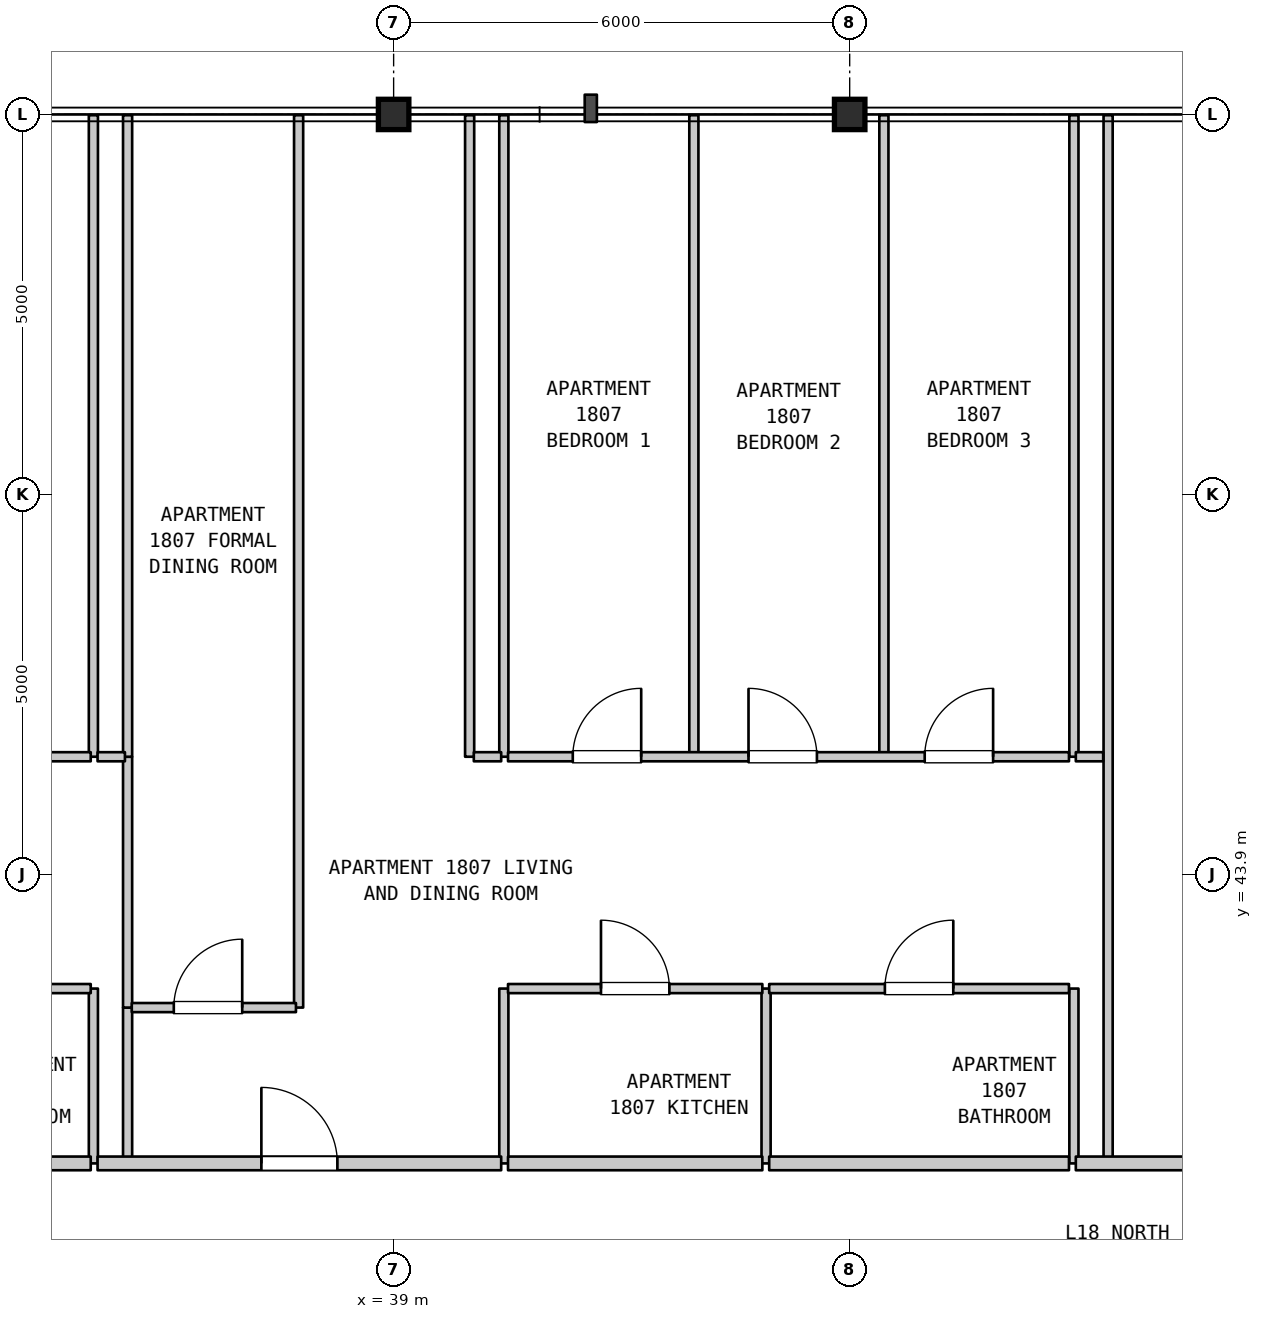
"""IFC4 building model, lengths in metres.
Left out: names, types, materials, properties, quantities, classifications, styles, units other than length and angle.
Written with IfcOpenShell. Run it as: python <this file> out.ifc"""

import sys

from ifc_helpers import new_model, si_unit, direction, frame, frame_2d, origin, origin_2d, place, context, subcontext, project, spatial, rectangle, i_section, extrude, element, fill, save


model = new_model("IFC4")
c1 = context("Model", 3, precision=1e-05, world=origin(), true_north=direction((0.0, 1.0)))
c2 = subcontext(c1, "Body", "Model", "MODEL_VIEW")
j1 = project(units=[si_unit("LENGTHUNIT", "METRE"), si_unit("PLANEANGLEUNIT", "RADIAN")], contexts=[c1])
p1 = place(None, origin())
s1 = spatial("IfcSite", under=j1, at=p1, CompositionType="ELEMENT")
p2 = place(p1, origin())
s2 = spatial("IfcBuilding", under=s1, at=p2, CompositionType="ELEMENT")
p3 = place(p2, frame((0.0, 0.0, 77.5)))
s3 = spatial("IfcBuildingStorey", under=s2, at=p3, CompositionType="ELEMENT", Elevation=77.5)
for number, where, z_axis, x_axis in (
    (1, (39.0, 53.9, 0.0), (0.0, 0.0, 1.0), (1.0, 0.0, 0.0)),
    (2, (45.0, 53.9, 0.0), (0.0, 0.0, 1.0), (1.0, 0.0, 0.0)),
):
    element("IfcColumn", number, at=place(p3, frame(where, z_axis=z_axis, x_axis=x_axis)), inside=s3, PredefinedType="COLUMN", context=c2, shape_type="SweptSolid", body=[
        extrude(i_section(OverallWidth=0.401, OverallDepth=0.399, WebThickness=0.025, FlangeThickness=0.04, FilletRadius=0.015, at=origin_2d()), origin(), (0.0, 0.0, 1.0), 3.7),
    ])
p4 = place(p3, frame((35.05, 40.1, 0.0), z_axis=(0.0, 0.0, 1.0), x_axis=(0.0, 1.0, 0.0)))
e3 = element("IfcWall", 3, at=p4, inside=s3, PredefinedType="PARTITIONING", context=c2, shape_type="SweptSolid", body=[
    extrude(rectangle(XDim=2.3, YDim=0.12, at=frame_2d((1.15, 0.0))), origin(), (0.0, 0.0, 1.0), 3.28),
])
p5 = place(p3, frame((35.05, 45.45, 0.0), z_axis=(0.0, 0.0, 1.0), x_axis=(0.0, 1.0, 0.0)))
e4 = element("IfcWall", 4, at=p5, inside=s3, PredefinedType="PARTITIONING", context=c2, shape_type="SweptSolid", body=[
    extrude(rectangle(XDim=8.44, YDim=0.12, at=frame_2d((4.22, 0.0))), origin(), (0.0, 0.0, 1.0), 3.28),
])
p6 = place(p3, frame((35.5, 40.1, 0.0), z_axis=(0.0, 0.0, 1.0), x_axis=(0.0, 1.0, 0.0)))
e5 = element("IfcWall", 5, at=p6, inside=s3, PredefinedType="PARTITIONING", context=c2, shape_type="SweptSolid", body=[
    extrude(rectangle(XDim=2.05, YDim=0.12, at=frame_2d((1.025, 0.0))), origin(), (0.0, 0.0, 1.0), 3.28),
])
p7 = place(p3, frame((35.5, 42.15, 0.0), z_axis=(0.0, 0.0, 1.0), x_axis=(0.0, 1.0, 0.0)))
e6 = element("IfcWall", 6, at=p7, inside=s3, PredefinedType="PARTITIONING", context=c2, shape_type="SweptSolid", body=[
    extrude(rectangle(XDim=3.3, YDim=0.12, at=frame_2d((1.65, 0.0))), origin(), (0.0, 0.0, 1.0), 3.28),
])
p8 = place(p3, frame((35.5, 45.45, 0.0), z_axis=(0.0, 0.0, 1.0), x_axis=(0.0, 1.0, 0.0)))
e7 = element("IfcWall", 7, at=p8, inside=s3, PredefinedType="PARTITIONING", context=c2, shape_type="SweptSolid", body=[
    extrude(rectangle(XDim=8.44, YDim=0.12, at=frame_2d((4.22, 0.0))), origin(), (0.0, 0.0, 1.0), 3.28),
])
p9 = place(p3, frame((37.75, 42.15, 0.0), z_axis=(0.0, 0.0, 1.0), x_axis=(0.0, 1.0, 0.0)))
e8 = element("IfcWall", 8, at=p9, inside=s3, PredefinedType="PARTITIONING", context=c2, shape_type="SweptSolid", body=[
    extrude(rectangle(XDim=11.74, YDim=0.12, at=frame_2d((5.87, 0.0))), origin(), (0.0, 0.0, 1.0), 3.28),
])
p10 = place(p3, frame((40.0, 45.45, 0.0), z_axis=(0.0, 0.0, 1.0), x_axis=(0.0, 1.0, 0.0)))
e9 = element("IfcWall", 9, at=p10, inside=s3, PredefinedType="PARTITIONING", context=c2, shape_type="SweptSolid", body=[
    extrude(rectangle(XDim=8.44, YDim=0.12, at=frame_2d((4.22, 0.0))), origin(), (0.0, 0.0, 1.0), 3.28),
])
p11 = place(p3, frame((40.45, 40.1, 0.0), z_axis=(0.0, 0.0, 1.0), x_axis=(0.0, 1.0, 0.0)))
e10 = element("IfcWall", 10, at=p11, inside=s3, PredefinedType="PARTITIONING", context=c2, shape_type="SweptSolid", body=[
    extrude(rectangle(XDim=2.3, YDim=0.12, at=frame_2d((1.15, 0.0))), origin(), (0.0, 0.0, 1.0), 3.28),
])
for number, where, z_axis, x_axis in (
    (11, (40.45, 45.45, 0.0), (0.0, 0.0, 1.0), (0.0, 1.0, 0.0)),
    (12, (42.95, 45.45, 0.0), (0.0, 0.0, 1.0), (0.0, 1.0, 0.0)),
):
    element("IfcWall", number, at=place(p3, frame(where, z_axis=z_axis, x_axis=x_axis)), inside=s3, PredefinedType="PARTITIONING", context=c2, shape_type="SweptSolid", body=[
        extrude(rectangle(XDim=8.44, YDim=0.12, at=frame_2d((4.22, 0.0))), origin(), (0.0, 0.0, 1.0), 3.28),
    ])
p12 = place(p3, frame((43.9, 40.1, 0.0), z_axis=(0.0, 0.0, 1.0), x_axis=(0.0, 1.0, 0.0)))
e13 = element("IfcWall", 13, at=p12, inside=s3, PredefinedType="PARTITIONING", context=c2, shape_type="SweptSolid", body=[
    extrude(rectangle(XDim=2.3, YDim=0.12, at=frame_2d((1.15, 0.0))), origin(), (0.0, 0.0, 1.0), 3.28),
])
p13 = place(p3, frame((45.45, 45.45, 0.0), z_axis=(0.0, 0.0, 1.0), x_axis=(0.0, 1.0, 0.0)))
e14 = element("IfcWall", 14, at=p13, inside=s3, PredefinedType="PARTITIONING", context=c2, shape_type="SweptSolid", body=[
    extrude(rectangle(XDim=8.44, YDim=0.12, at=frame_2d((4.22, 0.0))), origin(), (0.0, 0.0, 1.0), 3.28),
])
p14 = place(p3, frame((47.95, 40.1, 0.0), z_axis=(0.0, 0.0, 1.0), x_axis=(0.0, 1.0, 0.0)))
e15 = element("IfcWall", 15, at=p14, inside=s3, PredefinedType="PARTITIONING", context=c2, shape_type="SweptSolid", body=[
    extrude(rectangle(XDim=2.3, YDim=0.12, at=frame_2d((1.15, 0.0))), origin(), (0.0, 0.0, 1.0), 3.28),
])
p15 = place(p3, frame((47.95, 45.45, 0.0), z_axis=(0.0, 0.0, 1.0), x_axis=(0.0, 1.0, 0.0)))
e16 = element("IfcWall", 16, at=p15, inside=s3, PredefinedType="PARTITIONING", context=c2, shape_type="SweptSolid", body=[
    extrude(rectangle(XDim=8.44, YDim=0.12, at=frame_2d((4.22, 0.0))), origin(), (0.0, 0.0, 1.0), 3.28),
])
p16 = place(p3, frame((48.4, 40.1, 0.0), z_axis=(0.0, 0.0, 1.0), x_axis=(0.0, 1.0, 0.0)))
e17 = element("IfcWall", 17, at=p16, inside=s3, PredefinedType="PARTITIONING", context=c2, shape_type="SweptSolid", body=[
    extrude(rectangle(XDim=13.79, YDim=0.12, at=frame_2d((6.895, 0.0))), origin(), (0.0, 0.0, 1.0), 3.28),
])
p17 = place(p3, frame((31.071, 40.1, 0.0), z_axis=(0.0, 0.0, 1.0), x_axis=(1.0, 0.0, 0.0)))
e18 = element("IfcWall", 18, at=p17, inside=s3, PredefinedType="STANDARD", context=c2, shape_type="SweptSolid", body=[
    extrude(rectangle(XDim=3.944, YDim=0.18, at=frame_2d((1.972, 0.0))), origin(), (0.0, 0.0, 1.0), 3.28),
])
p18 = place(p3, frame((35.105, 40.1, 0.0), z_axis=(0.0, 0.0, 1.0), x_axis=(1.0, 0.0, 0.0)))
e19 = element("IfcWall", 19, at=p18, inside=s3, PredefinedType="STANDARD", context=c2, shape_type="SweptSolid", body=[
    extrude(rectangle(XDim=5.31, YDim=0.18, at=frame_2d((2.655, 0.0))), origin(), (0.0, 0.0, 1.0), 3.28),
])
p19 = place(p18, frame((2.155, 0.0, 0.0)))
e20 = element("IfcOpeningElement", 20, at=p19, cuts=e19, PredefinedType="OPENING", context=c2, shape_type="SweptSolid", body=[
    extrude(rectangle(XDim=1.0, YDim=2.15, at=frame_2d((0.5, 1.075))), frame((0.0, 0.1, 0.0), z_axis=(0.0, -1.0, 0.0), x_axis=(1.0, 0.0, 0.0)), (0.0, 0.0, 1.0), 0.2),
])
p20 = place(p3, frame((40.505, 40.1, 0.0), z_axis=(0.0, 0.0, 1.0), x_axis=(1.0, 0.0, 0.0)))
e21 = element("IfcWall", 21, at=p20, inside=s3, PredefinedType="STANDARD", context=c2, shape_type="SweptSolid", body=[
    extrude(rectangle(XDim=3.346, YDim=0.18, at=frame_2d((1.673, 0.0))), origin(), (0.0, 0.0, 1.0), 3.28),
])
p21 = place(p3, frame((43.941, 40.1, 0.0), z_axis=(0.0, 0.0, 1.0), x_axis=(1.0, 0.0, 0.0)))
e22 = element("IfcWall", 22, at=p21, inside=s3, PredefinedType="STANDARD", context=c2, shape_type="SweptSolid", body=[
    extrude(rectangle(XDim=3.944, YDim=0.18, at=frame_2d((1.972, 0.0))), origin(), (0.0, 0.0, 1.0), 3.28),
])
p22 = place(p3, frame((47.975, 40.1, 0.0), z_axis=(0.0, 0.0, 1.0), x_axis=(1.0, 0.0, 0.0)))
e23 = element("IfcWall", 23, at=p22, inside=s3, PredefinedType="STANDARD", context=c2, shape_type="SweptSolid", body=[
    extrude(rectangle(XDim=5.28, YDim=0.18, at=frame_2d((2.64, 0.0))), origin(), (0.0, 0.0, 1.0), 3.28),
])
p23 = place(p22, frame((2.34, 0.0, 0.0)))
e24 = element("IfcOpeningElement", 24, at=p23, cuts=e23, PredefinedType="OPENING", context=c2, shape_type="SweptSolid", body=[
    extrude(rectangle(XDim=1.0, YDim=2.15, at=frame_2d((0.5, 1.075))), frame((0.0, 0.1, 0.0), z_axis=(0.0, -1.0, 0.0), x_axis=(1.0, 0.0, 0.0)), (0.0, 0.0, 1.0), 0.2),
])
p24 = place(p3, frame((35.555, 42.15, 0.0), z_axis=(0.0, 0.0, 1.0), x_axis=(1.0, 0.0, 0.0)))
e25 = element("IfcWall", 25, at=p24, inside=s3, PredefinedType="PARTITIONING", context=c2, shape_type="SweptSolid", body=[
    extrude(rectangle(XDim=2.16, YDim=0.12, at=frame_2d((1.08, 0.0))), origin(), (0.0, 0.0, 1.0), 3.28),
])
p25 = place(p24, frame((0.553, 0.0, 0.0)))
e26 = element("IfcOpeningElement", 26, at=p25, cuts=e25, PredefinedType="OPENING", context=c2, shape_type="SweptSolid", body=[
    extrude(rectangle(XDim=0.9, YDim=2.15, at=frame_2d((0.45, 1.075))), frame((0.0, 0.07, 0.0), z_axis=(0.0, -1.0, 0.0), x_axis=(1.0, 0.0, 0.0)), (0.0, 0.0, 1.0), 0.14),
])
p26 = place(p3, frame((31.071, 42.4, 0.0), z_axis=(0.0, 0.0, 1.0), x_axis=(1.0, 0.0, 0.0)))
e27 = element("IfcWall", 27, at=p26, inside=s3, PredefinedType="PARTITIONING", context=c2, shape_type="SweptSolid", body=[
    extrude(rectangle(XDim=3.944, YDim=0.12, at=frame_2d((1.972, 0.0))), origin(), (0.0, 0.0, 1.0), 3.28),
])
p27 = place(p26, frame((1.522, 0.0, 0.0)))
e28 = element("IfcOpeningElement", 28, at=p27, cuts=e27, PredefinedType="OPENING", context=c2, shape_type="SweptSolid", body=[
    extrude(rectangle(XDim=0.9, YDim=2.1, at=frame_2d((0.45, 1.05))), frame((0.0, 0.07, 0.0), z_axis=(0.0, -1.0, 0.0), x_axis=(1.0, 0.0, 0.0)), (0.0, 0.0, 1.0), 0.14),
])
p28 = place(p3, frame((40.505, 42.4, 0.0), z_axis=(0.0, 0.0, 1.0), x_axis=(1.0, 0.0, 0.0)))
e29 = element("IfcWall", 29, at=p28, inside=s3, PredefinedType="PARTITIONING", context=c2, shape_type="SweptSolid", body=[
    extrude(rectangle(XDim=3.346, YDim=0.12, at=frame_2d((1.673, 0.0))), origin(), (0.0, 0.0, 1.0), 3.28),
])
p29 = place(p28, frame((1.223, 0.0, 0.0)))
e30 = element("IfcOpeningElement", 30, at=p29, cuts=e29, PredefinedType="OPENING", context=c2, shape_type="SweptSolid", body=[
    extrude(rectangle(XDim=0.9, YDim=2.15, at=frame_2d((0.45, 1.075))), frame((0.0, 0.07, 0.0), z_axis=(0.0, -1.0, 0.0), x_axis=(1.0, 0.0, 0.0)), (0.0, 0.0, 1.0), 0.14),
])
p30 = place(p3, frame((43.941, 42.4, 0.0), z_axis=(0.0, 0.0, 1.0), x_axis=(1.0, 0.0, 0.0)))
e31 = element("IfcWall", 31, at=p30, inside=s3, PredefinedType="PARTITIONING", context=c2, shape_type="SweptSolid", body=[
    extrude(rectangle(XDim=3.944, YDim=0.12, at=frame_2d((1.972, 0.0))), origin(), (0.0, 0.0, 1.0), 3.28),
])
p31 = place(p30, frame((1.522, 0.0, 0.0)))
e32 = element("IfcOpeningElement", 32, at=p31, cuts=e31, PredefinedType="OPENING", context=c2, shape_type="SweptSolid", body=[
    extrude(rectangle(XDim=0.9, YDim=2.1, at=frame_2d((0.45, 1.05))), frame((0.0, 0.07, 0.0), z_axis=(0.0, -1.0, 0.0), x_axis=(1.0, 0.0, 0.0)), (0.0, 0.0, 1.0), 0.14),
])
p32 = place(p3, frame((27.635, 45.45, 0.0), z_axis=(0.0, 0.0, 1.0), x_axis=(1.0, 0.0, 0.0)))
e33 = element("IfcWall", 33, at=p32, inside=s3, PredefinedType="PARTITIONING", context=c2, shape_type="SweptSolid", body=[
    extrude(rectangle(XDim=7.38, YDim=0.12, at=frame_2d((3.69, 0.0))), origin(), (0.0, 0.0, 1.0), 3.28),
])
p33 = place(p32, frame((0.852, 0.0, 0.0)))
e34 = element("IfcOpeningElement", 34, at=p33, cuts=e33, PredefinedType="OPENING", context=c2, shape_type="SweptSolid", body=[
    extrude(rectangle(XDim=0.9, YDim=2.15, at=frame_2d((0.45, 1.075))), frame((0.0, 0.07, 0.0), z_axis=(0.0, -1.0, 0.0), x_axis=(1.0, 0.0, 0.0)), (0.0, 0.0, 1.0), 0.14),
])
p34 = place(p32, frame((3.164, 0.0, 0.0)))
e35 = element("IfcOpeningElement", 35, at=p34, cuts=e33, PredefinedType="OPENING", context=c2, shape_type="SweptSolid", body=[
    extrude(rectangle(XDim=0.9, YDim=2.15, at=frame_2d((0.45, 1.075))), frame((0.0, 0.07, 0.0), z_axis=(0.0, -1.0, 0.0), x_axis=(1.0, 0.0, 0.0)), (0.0, 0.0, 1.0), 0.14),
])
p35 = place(p32, frame((5.482, 0.0, 0.0)))
e36 = element("IfcOpeningElement", 36, at=p35, cuts=e33, PredefinedType="OPENING", context=c2, shape_type="SweptSolid", body=[
    extrude(rectangle(XDim=0.9, YDim=2.15, at=frame_2d((0.45, 1.075))), frame((0.0, 0.07, 0.0), z_axis=(0.0, -1.0, 0.0), x_axis=(1.0, 0.0, 0.0)), (0.0, 0.0, 1.0), 0.14),
])
for number, where, z_axis, x_axis in (
    (37, (35.105, 45.45, 0.0), (0.0, 0.0, 1.0), (1.0, 0.0, 0.0)),
    (38, (40.055, 45.45, 0.0), (0.0, 0.0, 1.0), (1.0, 0.0, 0.0)),
):
    element("IfcWall", number, at=place(p3, frame(where, z_axis=z_axis, x_axis=x_axis)), inside=s3, PredefinedType="PARTITIONING", context=c2, shape_type="SweptSolid", body=[
        extrude(rectangle(XDim=0.36, YDim=0.12, at=frame_2d((0.18, 0.0))), origin(), (0.0, 0.0, 1.0), 3.28),
    ])
p36 = place(p3, frame((40.505, 45.45, 0.0), z_axis=(0.0, 0.0, 1.0), x_axis=(1.0, 0.0, 0.0)))
e39 = element("IfcWall", 39, at=p36, inside=s3, PredefinedType="PARTITIONING", context=c2, shape_type="SweptSolid", body=[
    extrude(rectangle(XDim=7.38, YDim=0.12, at=frame_2d((3.69, 0.0))), origin(), (0.0, 0.0, 1.0), 3.28),
])
p37 = place(p36, frame((0.852, 0.0, 0.0)))
e40 = element("IfcOpeningElement", 40, at=p37, cuts=e39, PredefinedType="OPENING", context=c2, shape_type="SweptSolid", body=[
    extrude(rectangle(XDim=0.9, YDim=2.15, at=frame_2d((0.45, 1.075))), frame((0.0, 0.07, 0.0), z_axis=(0.0, -1.0, 0.0), x_axis=(1.0, 0.0, 0.0)), (0.0, 0.0, 1.0), 0.14),
])
p38 = place(p36, frame((3.164, 0.0, 0.0)))
e41 = element("IfcOpeningElement", 41, at=p38, cuts=e39, PredefinedType="OPENING", context=c2, shape_type="SweptSolid", body=[
    extrude(rectangle(XDim=0.9, YDim=2.15, at=frame_2d((0.45, 1.075))), frame((0.0, 0.07, 0.0), z_axis=(0.0, -1.0, 0.0), x_axis=(1.0, 0.0, 0.0)), (0.0, 0.0, 1.0), 0.14),
])
p39 = place(p36, frame((5.482, 0.0, 0.0)))
e42 = element("IfcOpeningElement", 42, at=p39, cuts=e39, PredefinedType="OPENING", context=c2, shape_type="SweptSolid", body=[
    extrude(rectangle(XDim=0.9, YDim=2.15, at=frame_2d((0.45, 1.075))), frame((0.0, 0.07, 0.0), z_axis=(0.0, -1.0, 0.0), x_axis=(1.0, 0.0, 0.0)), (0.0, 0.0, 1.0), 0.14),
])
p40 = place(p3, frame((47.975, 45.45, 0.0), z_axis=(0.0, 0.0, 1.0), x_axis=(1.0, 0.0, 0.0)))
e43 = element("IfcWall", 43, at=p40, inside=s3, PredefinedType="PARTITIONING", context=c2, shape_type="SweptSolid", body=[
    extrude(rectangle(XDim=0.36, YDim=0.12, at=frame_2d((0.18, 0.0))), origin(), (0.0, 0.0, 1.0), 3.28),
])
p41 = place(p19, origin())
e44 = element("IfcDoor", 44, at=p41, inside=s3, OperationType="SINGLE_SWING_LEFT", PredefinedType="DOOR", context=c2, shape_type="SweptSolid", body=[
    extrude(rectangle(XDim=1.0, YDim=2.15, at=frame_2d((0.5, 1.075))), frame((0.0, 0.025, 0.0), z_axis=(0.0, -1.0, 0.0), x_axis=(1.0, 0.0, 0.0)), (0.0, 0.0, 1.0), 0.05),
])
fill(e20, e44)
p42 = place(p25, origin())
e45 = element("IfcDoor", 45, at=p42, inside=s3, OperationType="SINGLE_SWING_RIGHT", PredefinedType="DOOR", context=c2, shape_type="SweptSolid", body=[
    extrude(rectangle(XDim=0.9, YDim=2.15, at=frame_2d((0.45, 1.075))), frame((0.0, 0.025, 0.0), z_axis=(0.0, -1.0, 0.0), x_axis=(1.0, 0.0, 0.0)), (0.0, 0.0, 1.0), 0.05),
])
fill(e26, e45)
p43 = place(p29, origin())
e46 = element("IfcDoor", 46, at=p43, inside=s3, OperationType="SINGLE_SWING_LEFT", PredefinedType="DOOR", context=c2, shape_type="SweptSolid", body=[
    extrude(rectangle(XDim=0.9, YDim=2.15, at=frame_2d((0.45, 1.075))), frame((0.0, 0.025, 0.0), z_axis=(0.0, -1.0, 0.0), x_axis=(1.0, 0.0, 0.0)), (0.0, 0.0, 1.0), 0.05),
])
fill(e30, e46)
p44 = place(p31, origin())
e47 = element("IfcDoor", 47, at=p44, inside=s3, OperationType="SINGLE_SWING_RIGHT", PredefinedType="DOOR", context=c2, shape_type="SweptSolid", body=[
    extrude(rectangle(XDim=0.9, YDim=2.1, at=frame_2d((0.45, 1.05))), frame((0.0, 0.025, 0.0), z_axis=(0.0, -1.0, 0.0), x_axis=(1.0, 0.0, 0.0)), (0.0, 0.0, 1.0), 0.05),
])
fill(e32, e47)
p45 = place(p37, origin())
e48 = element("IfcDoor", 48, at=p45, inside=s3, OperationType="SINGLE_SWING_RIGHT", PredefinedType="DOOR", context=c2, shape_type="SweptSolid", body=[
    extrude(rectangle(XDim=0.9, YDim=2.15, at=frame_2d((0.45, 1.075))), frame((0.0, 0.025, 0.0), z_axis=(0.0, -1.0, 0.0), x_axis=(1.0, 0.0, 0.0)), (0.0, 0.0, 1.0), 0.05),
])
fill(e40, e48)
p46 = place(p38, origin())
e49 = element("IfcDoor", 49, at=p46, inside=s3, OperationType="SINGLE_SWING_LEFT", PredefinedType="DOOR", context=c2, shape_type="SweptSolid", body=[
    extrude(rectangle(XDim=0.9, YDim=2.15, at=frame_2d((0.45, 1.075))), frame((0.0, 0.025, 0.0), z_axis=(0.0, -1.0, 0.0), x_axis=(1.0, 0.0, 0.0)), (0.0, 0.0, 1.0), 0.05),
])
fill(e41, e49)
p47 = place(p39, origin())
e50 = element("IfcDoor", 50, at=p47, inside=s3, OperationType="SINGLE_SWING_RIGHT", PredefinedType="DOOR", context=c2, shape_type="SweptSolid", body=[
    extrude(rectangle(XDim=0.9, YDim=2.15, at=frame_2d((0.45, 1.075))), frame((0.0, 0.025, 0.0), z_axis=(0.0, -1.0, 0.0), x_axis=(1.0, 0.0, 0.0)), (0.0, 0.0, 1.0), 0.05),
])
fill(e42, e50)
save(model, sys.argv[1])
